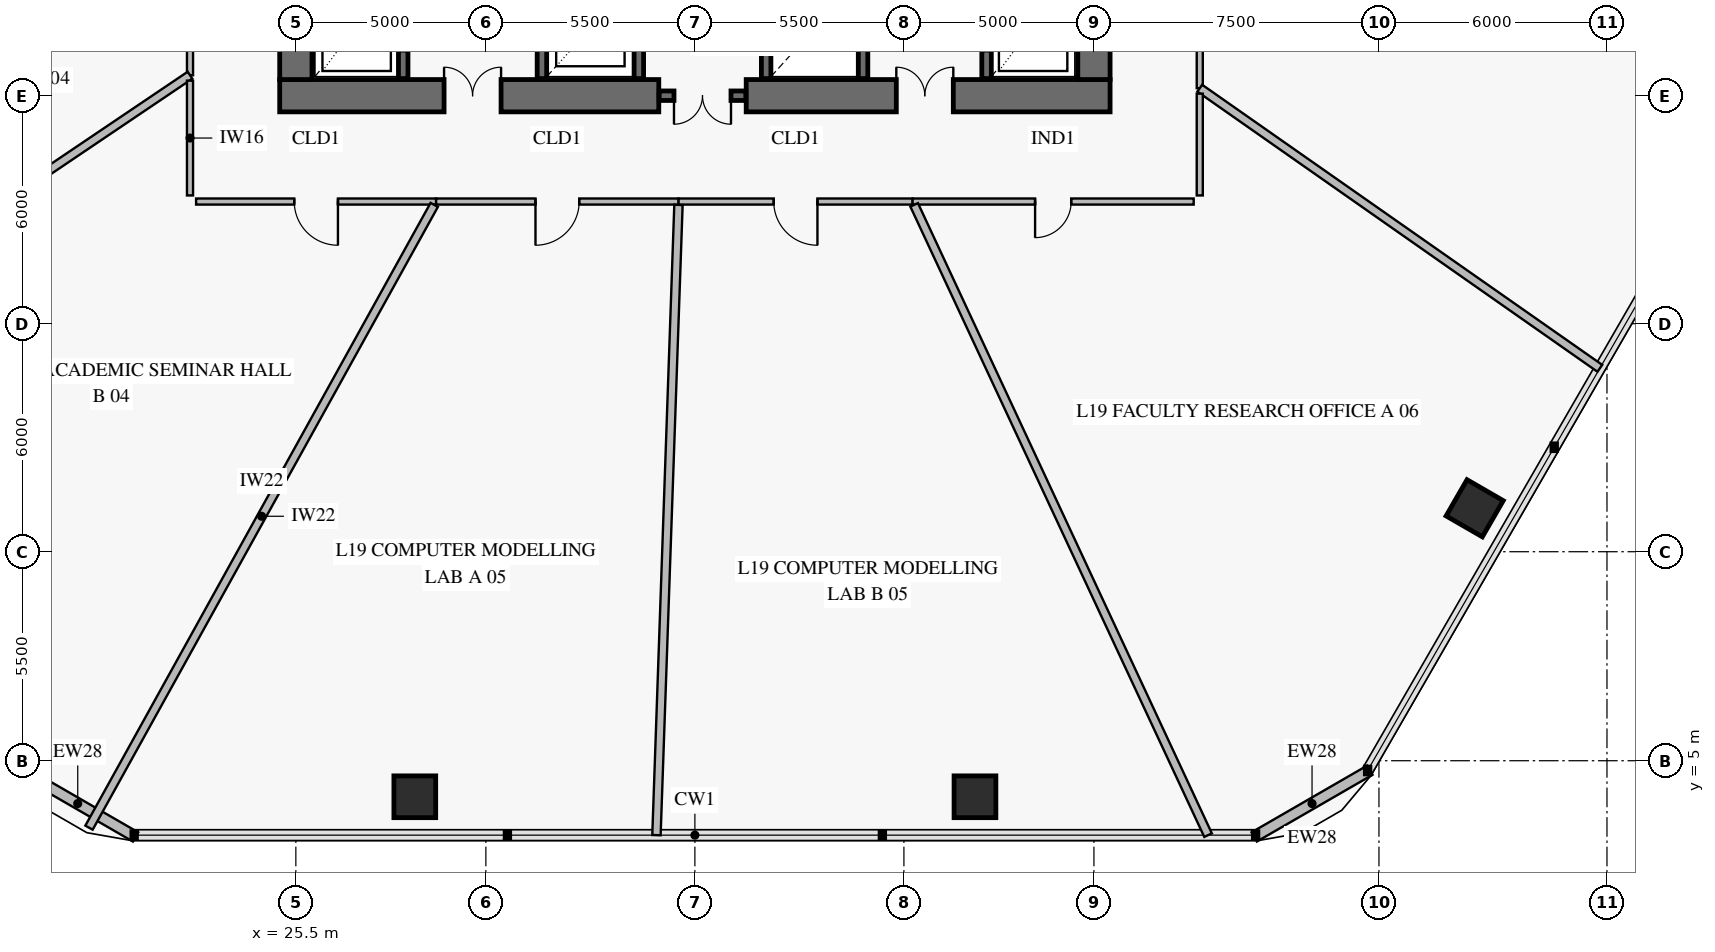
"""IFC4 building model, lengths in metres.
Left out: names, types, materials, properties, quantities, classifications, styles, units other than length and angle.
Written with IfcOpenShell. Run it as: python <this file> out.ifc"""

import sys

from ifc_helpers import new_model, si_unit, direction, frame, frame_2d, origin, origin_2d, place, context, subcontext, project, spatial, rectangle, extrude, element, fill, save


model = new_model("IFC4")
c1 = context("Model", 3, precision=1e-05, world=origin(), true_north=direction((0.0, 1.0)))
c2 = subcontext(c1, "Body", "Model", "MODEL_VIEW")
j1 = project(units=[si_unit("LENGTHUNIT", "METRE"), si_unit("PLANEANGLEUNIT", "RADIAN")], contexts=[c1])
p1 = place(None, origin())
s1 = spatial("IfcSite", under=j1, at=p1, CompositionType="ELEMENT")
p2 = place(p1, origin())
s2 = spatial("IfcBuilding", under=s1, at=p2, CompositionType="ELEMENT")
p3 = place(p2, frame((0.0, 0.0, 79.2)))
s3 = spatial("IfcBuildingStorey", under=s2, at=p3, CompositionType="ELEMENT", Elevation=79.2)
p4 = place(p3, frame((25.075, 22.5, 0.0), z_axis=(0.0, 0.0, 1.0), x_axis=(1.0, 0.0, 0.0)))
e1 = element("IfcWall", 1, at=p4, inside=s3, PredefinedType="SHEAR", context=c2, shape_type="SweptSolid", body=[
    extrude(rectangle(XDim=9.975, YDim=0.85, at=frame_2d((4.988, 0.0))), origin(), (0.0, 0.0, 1.0), 4.2),
])
p5 = place(p4, frame((4.325, 0.0, 0.0)))
e2 = element("IfcOpeningElement", 2, at=p5, cuts=e1, PredefinedType="OPENING", context=c2, shape_type="SweptSolid", body=[
    extrude(rectangle(XDim=1.5, YDim=2.15, at=frame_2d((0.75, 1.075))), frame((0.0, 0.437, 0.0), z_axis=(0.0, -1.0, 0.0), x_axis=(1.0, 0.0, 0.0)), (0.0, 0.0, 1.0), 0.874),
])
p6 = place(p3, frame((37.35, 22.5, 0.0), z_axis=(0.0, 0.0, 1.0), x_axis=(1.0, 0.0, 0.0)))
e3 = element("IfcWall", 3, at=p6, inside=s3, PredefinedType="SHEAR", context=c2, shape_type="SweptSolid", body=[
    extrude(rectangle(XDim=9.575, YDim=0.85, at=frame_2d((4.788, 0.0))), origin(), (0.0, 0.0, 1.0), 4.2),
])
p7 = place(p6, frame((3.95, 0.0, 0.0)))
e4 = element("IfcOpeningElement", 4, at=p7, cuts=e3, PredefinedType="OPENING", context=c2, shape_type="SweptSolid", body=[
    extrude(rectangle(XDim=1.5, YDim=2.15, at=frame_2d((0.75, 1.075))), frame((0.0, 0.437, 0.0), z_axis=(0.0, -1.0, 0.0), x_axis=(1.0, 0.0, 0.0)), (0.0, 0.0, 1.0), 0.874),
])
p8 = place(p3, frame((25.5, 22.925, 0.0), z_axis=(0.0, 0.0, 1.0), x_axis=(0.0, 1.0, 0.0)))
e5 = element("IfcWall", 5, at=p8, inside=s3, PredefinedType="SHEAR", context=c2, shape_type="SweptSolid", body=[
    extrude(rectangle(XDim=18.15, YDim=0.85, at=frame_2d((9.075, 0.0))), origin(), (0.0, 0.0, 1.0), 4.2),
])
p9 = place(p8, frame((8.825, 0.0, 0.0)))
e6 = element("IfcOpeningElement", 6, at=p9, cuts=e5, PredefinedType="OPENING", context=c2, shape_type="SweptSolid", body=[
    extrude(rectangle(XDim=1.1, YDim=2.15, at=frame_2d((0.55, 1.075))), frame((0.0, 0.437, 0.0), z_axis=(0.0, -1.0, 0.0), x_axis=(1.0, 0.0, 0.0)), (0.0, 0.0, 1.0), 0.874),
])
p10 = place(p3, frame((46.5, 22.925, 0.0), z_axis=(0.0, 0.0, 1.0), x_axis=(0.0, 1.0, 0.0)))
e7 = element("IfcWall", 7, at=p10, inside=s3, PredefinedType="SHEAR", context=c2, shape_type="SweptSolid", body=[
    extrude(rectangle(XDim=18.15, YDim=0.85, at=frame_2d((9.075, 0.0))), origin(), (0.0, 0.0, 1.0), 4.2),
])
p11 = place(p10, frame((8.825, 0.0, 0.0)))
e8 = element("IfcOpeningElement", 8, at=p11, cuts=e7, PredefinedType="OPENING", context=c2, shape_type="SweptSolid", body=[
    extrude(rectangle(XDim=1.1, YDim=2.15, at=frame_2d((0.55, 1.075))), frame((0.0, 0.437, 0.0), z_axis=(0.0, -1.0, 0.0), x_axis=(1.0, 0.0, 0.0)), (0.0, 0.0, 1.0), 0.874),
])
for number, where, z_axis, x_axis in (
    (9, (28.63, 4.052, 0.0), (0.0, 0.0, 1.0), (1.0, 0.0, 0.0)),
    (10, (43.37, 4.052, 0.0), (0.0, 0.0, 1.0), (1.0, 0.0, 0.0)),
    (11, (56.519, 11.643, 0.0), (0.0, 0.0, 1.0), (0.5, 0.866, 0.0)),
):
    element("IfcColumn", number, at=place(p3, frame(where, z_axis=z_axis, x_axis=x_axis)), inside=s3, PredefinedType="COLUMN", context=c2, shape_type="SweptSolid", body=[
        extrude(rectangle(XDim=1.1, YDim=1.1, at=origin_2d()), origin(), (0.0, 0.0, 1.0), 3.92),
    ])
for number, where, z_axis, x_axis in (
    (12, (53.761, 4.751, 0.0), (0.0, 0.0, 1.0), (-0.866, -0.5, 0.0)),
    (13, (21.283, 2.994, 0.0), (0.0, 0.0, 1.0), (-0.866, 0.5, 0.0)),
):
    element("IfcWall", number, at=place(p3, frame(where, z_axis=z_axis, x_axis=x_axis)), inside=s3, PredefinedType="SOLIDWALL", context=c2, shape_type="SweptSolid", body=[
        extrude(rectangle(XDim=3.515, YDim=0.28, at=frame_2d((1.757, 0.0))), origin(), (0.0, 0.0, 1.0), 3.92),
    ])
p12 = place(p3, frame((35.06, 22.5, 0.0), z_axis=(0.0, 0.0, 1.0), x_axis=(1.0, 0.0, 0.0)))
e14 = element("IfcWall", 14, at=p12, inside=s3, PredefinedType="SOLIDWALL", context=c2, shape_type="SweptSolid", body=[
    extrude(rectangle(XDim=2.28, YDim=0.25, at=frame_2d((1.14, 0.0))), origin(), (0.0, 0.0, 1.0), 4.2),
])
p13 = place(p12, frame((0.39, 0.0, 0.0)))
e15 = element("IfcOpeningElement", 15, at=p13, cuts=e14, PredefinedType="OPENING", context=c2, shape_type="SweptSolid", body=[
    extrude(rectangle(XDim=1.5, YDim=2.15, at=frame_2d((0.75, 1.075))), frame((0.0, 0.137, 0.0), z_axis=(0.0, -1.0, 0.0), x_axis=(1.0, 0.0, 0.0)), (0.0, 0.0, 1.0), 0.274),
])
p14 = place(p3, frame((28.325, 22.95, 0.0), z_axis=(0.0, 0.0, 1.0), x_axis=(0.0, 1.0, 0.0)))
e16 = element("IfcWall", 16, at=p14, inside=s3, PredefinedType="SOLIDWALL", context=c2, shape_type="SweptSolid", body=[
    extrude(rectangle(XDim=8.2, YDim=0.25, at=frame_2d((4.1, 0.0))), origin(), (0.0, 0.0, 1.0), 4.2),
])
p15 = place(p14, frame((0.75, 0.0, 0.0)))
e17 = element("IfcOpeningElement", 17, at=p15, cuts=e16, PredefinedType="OPENING", context=c2, shape_type="SweptSolid", body=[
    extrude(rectangle(XDim=1.3, YDim=2.3, at=frame_2d((0.65, 1.15))), frame((0.0, 0.137, 0.0), z_axis=(0.0, -1.0, 0.0), x_axis=(1.0, 0.0, 0.0)), (0.0, 0.0, 1.0), 0.274),
])
p16 = place(p14, frame((3.78, 0.0, 0.0)))
e18 = element("IfcOpeningElement", 18, at=p16, cuts=e16, PredefinedType="OPENING", context=c2, shape_type="SweptSolid", body=[
    extrude(rectangle(XDim=0.9, YDim=2.1, at=frame_2d((0.45, 1.05))), frame((0.0, 0.137, 0.0), z_axis=(0.0, -1.0, 0.0), x_axis=(1.0, 0.0, 0.0)), (0.0, 0.0, 1.0), 0.274),
])
p17 = place(p14, frame((6.5, 0.0, 0.0)))
e19 = element("IfcOpeningElement", 19, at=p17, cuts=e16, PredefinedType="OPENING", context=c2, shape_type="SweptSolid", body=[
    extrude(rectangle(XDim=0.9, YDim=2.1, at=frame_2d((0.45, 1.05))), frame((0.0, 0.137, 0.0), z_axis=(0.0, -1.0, 0.0), x_axis=(1.0, 0.0, 0.0)), (0.0, 0.0, 1.0), 0.274),
])
p18 = place(p3, frame((31.975, 22.95, 0.0), z_axis=(0.0, 0.0, 1.0), x_axis=(0.0, 1.0, 0.0)))
e20 = element("IfcWall", 20, at=p18, inside=s3, PredefinedType="SOLIDWALL", context=c2, shape_type="SweptSolid", body=[
    extrude(rectangle(XDim=8.2, YDim=0.25, at=frame_2d((4.1, 0.0))), origin(), (0.0, 0.0, 1.0), 4.2),
])
p19 = place(p3, frame((34.525, 22.95, 0.0), z_axis=(0.0, 0.0, 1.0), x_axis=(0.0, 1.0, 0.0)))
e21 = element("IfcWall", 21, at=p19, inside=s3, PredefinedType="SOLIDWALL", context=c2, shape_type="SweptSolid", body=[
    extrude(rectangle(XDim=8.2, YDim=0.25, at=frame_2d((4.1, 0.0))), origin(), (0.0, 0.0, 1.0), 4.2),
])
p20 = place(p19, frame((0.775, 0.0, 0.0)))
e22 = element("IfcOpeningElement", 22, at=p20, cuts=e21, PredefinedType="OPENING", context=c2, shape_type="SweptSolid", body=[
    extrude(rectangle(XDim=1.1, YDim=2.2, at=frame_2d((0.55, 1.1))), frame((0.0, 0.137, 0.0), z_axis=(0.0, -1.0, 0.0), x_axis=(1.0, 0.0, 0.0)), (0.0, 0.0, 1.0), 0.274),
])
p21 = place(p19, frame((3.575, 0.0, 0.0)))
e23 = element("IfcOpeningElement", 23, at=p21, cuts=e21, PredefinedType="OPENING", context=c2, shape_type="SweptSolid", body=[
    extrude(rectangle(XDim=1.1, YDim=2.2, at=frame_2d((0.55, 1.1))), frame((0.0, 0.137, 0.0), z_axis=(0.0, -1.0, 0.0), x_axis=(1.0, 0.0, 0.0)), (0.0, 0.0, 1.0), 0.274),
])
p22 = place(p19, frame((6.375, 0.0, 0.0)))
e24 = element("IfcOpeningElement", 24, at=p22, cuts=e21, PredefinedType="OPENING", context=c2, shape_type="SweptSolid", body=[
    extrude(rectangle(XDim=1.1, YDim=2.2, at=frame_2d((0.55, 1.1))), frame((0.0, 0.137, 0.0), z_axis=(0.0, -1.0, 0.0), x_axis=(1.0, 0.0, 0.0)), (0.0, 0.0, 1.0), 0.274),
])
for number, where, z_axis, x_axis in (
    (25, (37.875, 22.95, 0.0), (0.0, 0.0, 1.0), (0.0, 1.0, 0.0)),
    (26, (40.425, 22.95, 0.0), (0.0, 0.0, 1.0), (0.0, 1.0, 0.0)),
):
    element("IfcWall", number, at=place(p3, frame(where, z_axis=z_axis, x_axis=x_axis)), inside=s3, PredefinedType="SOLIDWALL", context=c2, shape_type="SweptSolid", body=[
        extrude(rectangle(XDim=8.2, YDim=0.25, at=frame_2d((4.1, 0.0))), origin(), (0.0, 0.0, 1.0), 4.2),
    ])
p23 = place(p3, frame((43.675, 22.95, 0.0), z_axis=(0.0, 0.0, 1.0), x_axis=(0.0, 1.0, 0.0)))
e27 = element("IfcWall", 27, at=p23, inside=s3, PredefinedType="SOLIDWALL", context=c2, shape_type="SweptSolid", body=[
    extrude(rectangle(XDim=8.2, YDim=0.25, at=frame_2d((4.1, 0.0))), origin(), (0.0, 0.0, 1.0), 4.2),
])
p24 = place(p23, frame((0.75, 0.0, 0.0)))
e28 = element("IfcOpeningElement", 28, at=p24, cuts=e27, PredefinedType="OPENING", context=c2, shape_type="SweptSolid", body=[
    extrude(rectangle(XDim=1.3, YDim=2.3, at=frame_2d((0.65, 1.15))), frame((0.0, 0.137, 0.0), z_axis=(0.0, -1.0, 0.0), x_axis=(1.0, 0.0, 0.0)), (0.0, 0.0, 1.0), 0.274),
])
p25 = place(p23, frame((3.7, 0.0, 0.0)))
e29 = element("IfcOpeningElement", 29, at=p25, cuts=e27, PredefinedType="OPENING", context=c2, shape_type="SweptSolid", body=[
    extrude(rectangle(XDim=1.3, YDim=2.3, at=frame_2d((0.65, 1.15))), frame((0.0, 0.137, 0.0), z_axis=(0.0, -1.0, 0.0), x_axis=(1.0, 0.0, 0.0)), (0.0, 0.0, 1.0), 0.274),
])
p26 = place(p23, frame((6.62, 0.0, 0.0)))
e30 = element("IfcOpeningElement", 30, at=p26, cuts=e27, PredefinedType="OPENING", context=c2, shape_type="SweptSolid", body=[
    extrude(rectangle(XDim=0.9, YDim=2.1, at=frame_2d((0.45, 1.05))), frame((0.0, 0.137, 0.0), z_axis=(0.0, -1.0, 0.0), x_axis=(1.0, 0.0, 0.0)), (0.0, 0.0, 1.0), 0.274),
])
p27 = place(p3, frame((22.715, 30.369, 0.0), z_axis=(0.0, 0.0, 1.0), x_axis=(0.0, -1.0, 0.0)))
e31 = element("IfcWall", 31, at=p27, inside=s3, PredefinedType="PARTITIONING", context=c2, shape_type="SweptSolid", body=[
    extrude(rectangle(XDim=7.33, YDim=0.16, at=frame_2d((3.665, 0.0))), origin(), (0.0, 0.0, 1.0), 3.22),
])
p28 = place(p27, frame((3.09, 0.0, 0.0)))
e32 = element("IfcOpeningElement", 32, at=p28, cuts=e31, PredefinedType="OPENING", context=c2, shape_type="SweptSolid", body=[
    extrude(rectangle(XDim=1.15, YDim=2.2, at=frame_2d((0.575, 1.1))), frame((0.0, 0.092, 0.0), z_axis=(0.0, -1.0, 0.0), x_axis=(1.0, 0.0, 0.0)), (0.0, 0.0, 1.0), 0.184),
])
p29 = place(p3, frame((22.875, 19.715, 0.0), z_axis=(0.0, 0.0, 1.0), x_axis=(1.0, 0.0, 0.0)))
e33 = element("IfcWall", 33, at=p29, inside=s3, PredefinedType="PARTITIONING", context=c2, shape_type="SweptSolid", body=[
    extrude(rectangle(XDim=6.315, YDim=0.16, at=frame_2d((3.158, 0.0))), origin(), (0.0, 0.0, 1.0), 3.22),
])
p30 = place(p29, frame((2.583, 0.0, 0.0)))
e34 = element("IfcOpeningElement", 34, at=p30, cuts=e33, PredefinedType="OPENING", context=c2, shape_type="SweptSolid", body=[
    extrude(rectangle(XDim=1.15, YDim=2.2, at=frame_2d((0.575, 1.1))), frame((0.0, 0.092, 0.0), z_axis=(0.0, -1.0, 0.0), x_axis=(1.0, 0.0, 0.0)), (0.0, 0.0, 1.0), 0.184),
])
p31 = place(p3, frame((29.19, 19.715, 0.0), z_axis=(0.0, 0.0, 1.0), x_axis=(1.0, 0.0, 0.0)))
e35 = element("IfcWall", 35, at=p31, inside=s3, PredefinedType="PARTITIONING", context=c2, shape_type="SweptSolid", body=[
    extrude(rectangle(XDim=6.381, YDim=0.16, at=frame_2d((3.19, 0.0))), origin(), (0.0, 0.0, 1.0), 3.22),
])
p32 = place(p31, frame((2.615, 0.0, 0.0)))
e36 = element("IfcOpeningElement", 36, at=p32, cuts=e35, PredefinedType="OPENING", context=c2, shape_type="SweptSolid", body=[
    extrude(rectangle(XDim=1.15, YDim=2.2, at=frame_2d((0.575, 1.1))), frame((0.0, 0.092, 0.0), z_axis=(0.0, -1.0, 0.0), x_axis=(1.0, 0.0, 0.0)), (0.0, 0.0, 1.0), 0.184),
])
p33 = place(p3, frame((35.571, 19.715, 0.0), z_axis=(0.0, 0.0, 1.0), x_axis=(1.0, 0.0, 0.0)))
e37 = element("IfcWall", 37, at=p33, inside=s3, PredefinedType="PARTITIONING", context=c2, shape_type="SweptSolid", body=[
    extrude(rectangle(XDim=6.157, YDim=0.16, at=frame_2d((3.079, 0.0))), origin(), (0.0, 0.0, 1.0), 3.22),
])
p34 = place(p33, frame((2.504, 0.0, 0.0)))
e38 = element("IfcOpeningElement", 38, at=p34, cuts=e37, PredefinedType="OPENING", context=c2, shape_type="SweptSolid", body=[
    extrude(rectangle(XDim=1.15, YDim=2.2, at=frame_2d((0.575, 1.1))), frame((0.0, 0.092, 0.0), z_axis=(0.0, -1.0, 0.0), x_axis=(1.0, 0.0, 0.0)), (0.0, 0.0, 1.0), 0.184),
])
p35 = place(p3, frame((41.729, 19.715, 0.0), z_axis=(0.0, 0.0, 1.0), x_axis=(1.0, 0.0, 0.0)))
e39 = element("IfcWall", 39, at=p35, inside=s3, PredefinedType="PARTITIONING", context=c2, shape_type="SweptSolid", body=[
    extrude(rectangle(XDim=7.396, YDim=0.16, at=frame_2d((3.698, 0.0))), origin(), (0.0, 0.0, 1.0), 3.22),
])
p36 = place(p35, frame((3.223, 0.0, 0.0)))
e40 = element("IfcOpeningElement", 40, at=p36, cuts=e39, PredefinedType="OPENING", context=c2, shape_type="SweptSolid", body=[
    extrude(rectangle(XDim=0.95, YDim=2.1, at=frame_2d((0.475, 1.05))), frame((0.0, 0.092, 0.0), z_axis=(0.0, -1.0, 0.0), x_axis=(1.0, 0.0, 0.0)), (0.0, 0.0, 1.0), 0.184),
])
p37 = place(p3, frame((49.285, 22.698, 0.0), z_axis=(0.0, 0.0, 1.0), x_axis=(0.0, 1.0, 0.0)))
e41 = element("IfcWall", 41, at=p37, inside=s3, PredefinedType="PARTITIONING", context=c2, shape_type="SweptSolid", body=[
    extrude(rectangle(XDim=8.14, YDim=0.16, at=frame_2d((4.07, 0.0))), origin(), (0.0, 0.0, 1.0), 3.22),
])
p38 = place(p37, frame((3.595, 0.0, 0.0)))
e42 = element("IfcOpeningElement", 42, at=p38, cuts=e41, PredefinedType="OPENING", context=c2, shape_type="SweptSolid", body=[
    extrude(rectangle(XDim=0.95, YDim=2.1, at=frame_2d((0.475, 1.05))), frame((0.0, 0.092, 0.0), z_axis=(0.0, -1.0, 0.0), x_axis=(1.0, 0.0, 0.0)), (0.0, 0.0, 1.0), 0.184),
])
p39 = place(p3, frame((22.715, 23.039, 0.0), z_axis=(0.0, 0.0, 1.0), x_axis=(-0.829037316792, -0.559193282654, 0.0)))
e43 = element("IfcWall", 43, at=p39, inside=s3, PredefinedType="PARTITIONING", context=c2, shape_type="SweptSolid", body=[
    extrude(rectangle(XDim=13.005, YDim=0.22, at=frame_2d((6.502, 0.0))), origin(), (0.0, 0.0, 1.0), 3.17),
])
p40 = place(p3, frame((22.715, 22.897, 0.0), z_axis=(0.0, 0.0, 1.0), x_axis=(0.0, -1.0, 0.0)))
e44 = element("IfcWall", 44, at=p40, inside=s3, PredefinedType="PARTITIONING", context=c2, shape_type="SweptSolid", body=[
    extrude(rectangle(XDim=3.022, YDim=0.16, at=frame_2d((1.511, 0.0))), origin(), (0.0, 0.0, 1.0), 3.92),
])
p41 = place(p3, frame((29.142, 19.627, 0.0), z_axis=(0.0, 0.0, 1.0), x_axis=(-0.484814111505, -0.874617217579, 0.0)))
e45 = element("IfcWall", 45, at=p41, inside=s3, PredefinedType="PARTITIONING", context=c2, shape_type="SweptSolid", body=[
    extrude(rectangle(XDim=18.738, YDim=0.22, at=frame_2d((9.369, 0.0))), origin(), (0.0, 0.0, 1.0), 3.17),
])
p42 = place(p3, frame((35.568, 19.627, 0.0), z_axis=(0.0, 0.0, 1.0), x_axis=(-0.034894977713, -0.999390984815, 0.0)))
e46 = element("IfcWall", 46, at=p42, inside=s3, PredefinedType="PARTITIONING", context=c2, shape_type="SweptSolid", body=[
    extrude(rectangle(XDim=16.595, YDim=0.22, at=frame_2d((8.298, 0.0))), origin(), (0.0, 0.0, 1.0), 3.17),
])
p43 = place(p3, frame((41.77, 19.627, 0.0), z_axis=(0.0, 0.0, 1.0), x_axis=(0.422616678834, -0.906308525156, 0.0)))
e47 = element("IfcWall", 47, at=p43, inside=s3, PredefinedType="PARTITIONING", context=c2, shape_type="SweptSolid", body=[
    extrude(rectangle(XDim=18.3, YDim=0.22, at=frame_2d((9.15, 0.0))), origin(), (0.0, 0.0, 1.0), 3.17),
])
p44 = place(p3, frame((49.285, 22.698, 0.0), z_axis=(0.0, 0.0, 1.0), x_axis=(0.819154265409, -0.57357326425, 0.0)))
e48 = element("IfcWall", 48, at=p44, inside=s3, PredefinedType="PARTITIONING", context=c2, shape_type="SweptSolid", body=[
    extrude(rectangle(XDim=12.851, YDim=0.22, at=frame_2d((6.426, 0.0))), origin(), (0.0, 0.0, 1.0), 3.17),
])
p45 = place(p3, frame((49.285, 19.875, 0.0), z_axis=(0.0, 0.0, 1.0), x_axis=(0.0, 1.0, 0.0)))
e49 = element("IfcWall", 49, at=p45, inside=s3, PredefinedType="PARTITIONING", context=c2, shape_type="SweptSolid", body=[
    extrude(rectangle(XDim=2.679, YDim=0.16, at=frame_2d((1.339, 0.0))), origin(), (0.0, 0.0, 1.0), 3.92),
])
p46 = place(p5, origin())
e50 = element("IfcDoor", 50, at=p46, inside=s3, OperationType="DOUBLE_DOOR_SINGLE_SWING", PredefinedType="DOOR", context=c2, shape_type="SweptSolid", body=[
    extrude(rectangle(XDim=1.5, YDim=2.15, at=frame_2d((0.75, 1.075))), frame((0.0, 0.025, 0.0), z_axis=(0.0, -1.0, 0.0), x_axis=(1.0, 0.0, 0.0)), (0.0, 0.0, 1.0), 0.05),
])
fill(e2, e50)
p47 = place(p7, origin())
e51 = element("IfcDoor", 51, at=p47, inside=s3, OperationType="DOUBLE_DOOR_SINGLE_SWING", PredefinedType="DOOR", context=c2, shape_type="SweptSolid", body=[
    extrude(rectangle(XDim=1.5, YDim=2.15, at=frame_2d((0.75, 1.075))), frame((0.0, 0.025, 0.0), z_axis=(0.0, -1.0, 0.0), x_axis=(1.0, 0.0, 0.0)), (0.0, 0.0, 1.0), 0.05),
])
fill(e4, e51)
p48 = place(p13, frame((1.5, 0.0, 0.0), z_axis=(0.0, 0.0, 1.0), x_axis=(-1.0, 0.0, 0.0)))
e52 = element("IfcDoor", 52, at=p48, inside=s3, OperationType="DOUBLE_DOOR_SINGLE_SWING", PredefinedType="DOOR", context=c2, shape_type="SweptSolid", body=[
    extrude(rectangle(XDim=1.5, YDim=2.15, at=frame_2d((0.75, 1.075))), frame((0.0, 0.025, 0.0), z_axis=(0.0, -1.0, 0.0), x_axis=(1.0, 0.0, 0.0)), (0.0, 0.0, 1.0), 0.05),
])
fill(e15, e52)
p49 = place(p30, frame((1.15, 0.0, 0.0), z_axis=(0.0, 0.0, 1.0), x_axis=(-1.0, 0.0, 0.0)))
e53 = element("IfcDoor", 53, at=p49, inside=s3, OperationType="SINGLE_SWING_LEFT", PredefinedType="DOOR", context=c2, shape_type="SweptSolid", body=[
    extrude(rectangle(XDim=1.15, YDim=2.2, at=frame_2d((0.575, 1.1))), frame((0.0, 0.025, 0.0), z_axis=(0.0, -1.0, 0.0), x_axis=(1.0, 0.0, 0.0)), (0.0, 0.0, 1.0), 0.05),
])
fill(e34, e53)
p50 = place(p32, frame((1.15, 0.0, 0.0), z_axis=(0.0, 0.0, 1.0), x_axis=(-1.0, 0.0, 0.0)))
e54 = element("IfcDoor", 54, at=p50, inside=s3, OperationType="SINGLE_SWING_RIGHT", PredefinedType="DOOR", context=c2, shape_type="SweptSolid", body=[
    extrude(rectangle(XDim=1.15, YDim=2.2, at=frame_2d((0.575, 1.1))), frame((0.0, 0.025, 0.0), z_axis=(0.0, -1.0, 0.0), x_axis=(1.0, 0.0, 0.0)), (0.0, 0.0, 1.0), 0.05),
])
fill(e36, e54)
p51 = place(p34, frame((1.15, 0.0, 0.0), z_axis=(0.0, 0.0, 1.0), x_axis=(-1.0, 0.0, 0.0)))
e55 = element("IfcDoor", 55, at=p51, inside=s3, OperationType="SINGLE_SWING_LEFT", PredefinedType="DOOR", context=c2, shape_type="SweptSolid", body=[
    extrude(rectangle(XDim=1.15, YDim=2.2, at=frame_2d((0.575, 1.1))), frame((0.0, 0.025, 0.0), z_axis=(0.0, -1.0, 0.0), x_axis=(1.0, 0.0, 0.0)), (0.0, 0.0, 1.0), 0.05),
])
fill(e38, e55)
p52 = place(p36, frame((0.95, 0.0, 0.0), z_axis=(0.0, 0.0, 1.0), x_axis=(-1.0, 0.0, 0.0)))
e56 = element("IfcDoor", 56, at=p52, inside=s3, OperationType="SINGLE_SWING_RIGHT", PredefinedType="DOOR", context=c2, shape_type="SweptSolid", body=[
    extrude(rectangle(XDim=0.95, YDim=2.1, at=frame_2d((0.475, 1.05))), frame((0.0, 0.025, 0.0), z_axis=(0.0, -1.0, 0.0), x_axis=(1.0, 0.0, 0.0)), (0.0, 0.0, 1.0), 0.05),
])
fill(e40, e56)
save(model, sys.argv[1])
